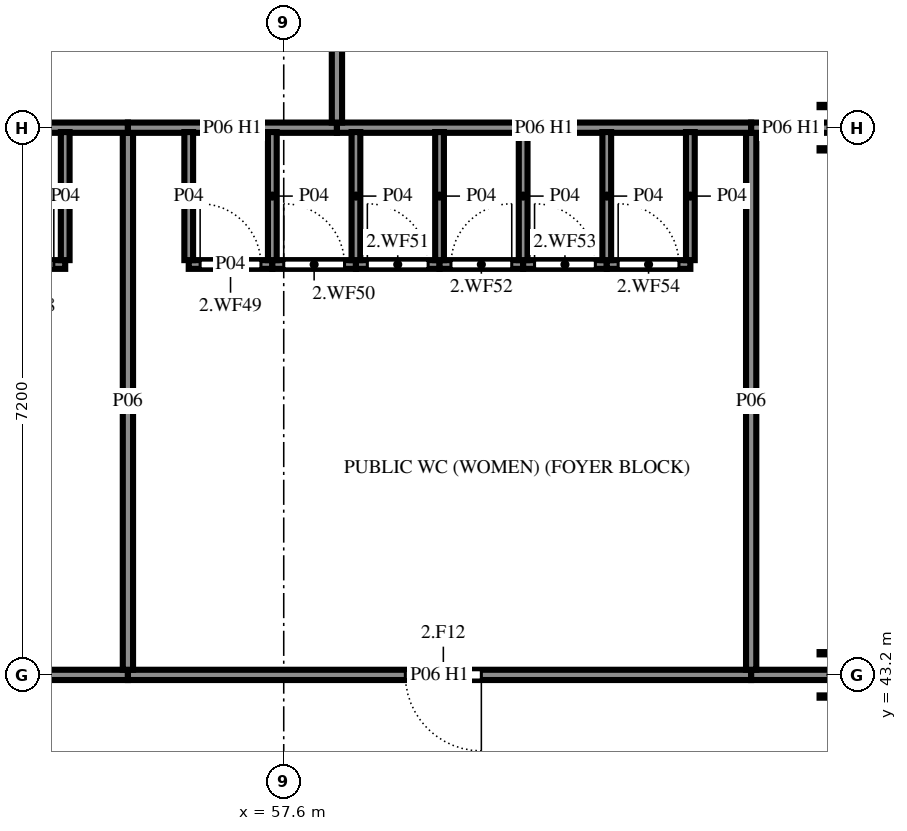
"""IFC4 building model, lengths in metres.
Left out: names, types, materials, properties, quantities, classifications, styles, units other than length and angle.
Written with IfcOpenShell. Run it as: python <this file> out.ifc"""

import sys

from ifc_helpers import new_model, si_unit, direction, frame, frame_2d, origin, origin_2d, place, context, subcontext, project, spatial, rectangle, i_section, extrude, element, fill, save


model = new_model("IFC4")
c1 = context("Model", 3, precision=1e-05, world=origin(), true_north=direction((0.0, 1.0)))
c2 = subcontext(c1, "Body", "Model", "MODEL_VIEW")
j1 = project(units=[si_unit("LENGTHUNIT", "METRE"), si_unit("PLANEANGLEUNIT", "RADIAN")], contexts=[c1])
p1 = place(None, origin())
s1 = spatial("IfcSite", under=j1, at=p1, CompositionType="ELEMENT")
p2 = place(p1, origin())
s2 = spatial("IfcBuilding", under=s1, at=p2, CompositionType="ELEMENT")
p3 = place(p2, frame((0.0, 0.0, 7.2)))
s3 = spatial("IfcBuildingStorey", under=s2, at=p3, CompositionType="ELEMENT", Elevation=7.2)
for number, where, z_axis, x_axis in (
    (1, (64.8, 43.2, 0.0), (0.0, 0.0, 1.0), (1.0, 0.0, 0.0)),
    (2, (64.8, 50.4, 0.0), (0.0, 0.0, 1.0), (1.0, 0.0, 0.0)),
):
    element("IfcColumn", number, at=place(p3, frame(where, z_axis=z_axis, x_axis=x_axis)), inside=s3, PredefinedType="COLUMN", context=c2, shape_type="SweptSolid", body=[
        extrude(i_section(OverallWidth=0.3, OverallDepth=0.6, WebThickness=0.015, FlangeThickness=0.03, FilletRadius=0.027, at=origin_2d()), origin(), (0.0, 0.0, 1.0), 3.6),
    ])
p4 = place(p3, frame((47.3, 43.2, 0.0), z_axis=(0.0, 0.0, 1.0), x_axis=(1.0, 0.0, 0.0)))
e3 = element("IfcWall", 3, at=p4, inside=s3, PredefinedType="PARTITIONING", context=c2, shape_type="SweptSolid", body=[
    extrude(rectangle(XDim=8.25, YDim=0.135, at=frame_2d((4.125, 0.0))), origin(), (0.0, 0.0, 1.0), 2.82),
])
p5 = place(p4, frame((3.65, 0.0, 0.0)))
e4 = element("IfcOpeningElement", 4, at=p5, cuts=e3, PredefinedType="OPENING", context=c2, shape_type="SweptSolid", body=[
    extrude(rectangle(XDim=1.0, YDim=2.4, at=frame_2d((0.5, 1.2))), frame((0.0, 0.077, 0.0), z_axis=(0.0, -1.0, 0.0), x_axis=(1.0, 0.0, 0.0)), (0.0, 0.0, 1.0), 0.155),
])
p6 = place(p3, frame((55.55, 43.2, 0.0), z_axis=(0.0, 0.0, 1.0), x_axis=(1.0, 0.0, 0.0)))
e5 = element("IfcWall", 5, at=p6, inside=s3, PredefinedType="PARTITIONING", context=c2, shape_type="SweptSolid", body=[
    extrude(rectangle(XDim=8.2, YDim=0.135, at=frame_2d((4.1, 0.0))), origin(), (0.0, 0.0, 1.0), 2.82),
])
p7 = place(p6, frame((3.65, 0.0, 0.0)))
e6 = element("IfcOpeningElement", 6, at=p7, cuts=e5, PredefinedType="OPENING", context=c2, shape_type="SweptSolid", body=[
    extrude(rectangle(XDim=1.0, YDim=2.4, at=frame_2d((0.5, 1.2))), frame((0.0, 0.077, 0.0), z_axis=(0.0, -1.0, 0.0), x_axis=(1.0, 0.0, 0.0)), (0.0, 0.0, 1.0), 0.155),
])
p8 = place(p3, frame((63.75, 43.2, 0.0), z_axis=(0.0, 0.0, 1.0), x_axis=(1.0, 0.0, 0.0)))
e7 = element("IfcWall", 7, at=p8, inside=s3, PredefinedType="PARTITIONING", context=c2, shape_type="SweptSolid", body=[
    extrude(rectangle(XDim=8.317, YDim=0.135, at=frame_2d((4.159, 0.0))), origin(), (0.0, 0.0, 1.0), 2.82),
])
p9 = place(p8, frame((3.65, 0.0, 0.0)))
e8 = element("IfcOpeningElement", 8, at=p9, cuts=e7, PredefinedType="OPENING", context=c2, shape_type="SweptSolid", body=[
    extrude(rectangle(XDim=1.0, YDim=2.4, at=frame_2d((0.5, 1.2))), frame((0.0, 0.077, 0.0), z_axis=(0.0, -1.0, 0.0), x_axis=(1.0, 0.0, 0.0)), (0.0, 0.0, 1.0), 0.155),
])
p10 = place(p3, frame((55.55, 50.333, 0.0), z_axis=(0.0, 0.0, 1.0), x_axis=(0.0, -1.0, 0.0)))
e9 = element("IfcWall", 9, at=p10, inside=s3, PredefinedType="PARTITIONING", context=c2, shape_type="SweptSolid", body=[
    extrude(rectangle(XDim=7.065, YDim=0.135, at=frame_2d((3.532, 0.0))), origin(), (0.0, 0.0, 1.0), 3.42),
])
p11 = place(p3, frame((48.25, 50.4, 0.0), z_axis=(0.0, 0.0, 1.0), x_axis=(1.0, 0.0, 0.0)))
e10 = element("IfcWall", 10, at=p11, inside=s3, PredefinedType="PARTITIONING", context=c2, shape_type="SweptSolid", body=[
    extrude(rectangle(XDim=7.3, YDim=0.135, at=frame_2d((3.65, 0.0))), origin(), (0.0, 0.0, 1.0), 2.82),
])
p12 = place(p3, frame((63.75, 50.333, 0.0), z_axis=(0.0, 0.0, 1.0), x_axis=(0.0, -1.0, 0.0)))
e11 = element("IfcWall", 11, at=p12, inside=s3, PredefinedType="PARTITIONING", context=c2, shape_type="SweptSolid", body=[
    extrude(rectangle(XDim=7.065, YDim=0.135, at=frame_2d((3.532, 0.0))), origin(), (0.0, 0.0, 1.0), 3.42),
])
p13 = place(p3, frame((55.55, 50.4, 0.0), z_axis=(0.0, 0.0, 1.0), x_axis=(1.0, 0.0, 0.0)))
e12 = element("IfcWall", 12, at=p13, inside=s3, PredefinedType="PARTITIONING", context=c2, shape_type="SweptSolid", body=[
    extrude(rectangle(XDim=2.75, YDim=0.135, at=frame_2d((1.375, 0.0))), origin(), (0.0, 0.0, 1.0), 2.82),
])
p14 = place(p3, frame((58.3, 50.4, 0.0), z_axis=(0.0, 0.0, 1.0), x_axis=(1.0, 0.0, 0.0)))
e13 = element("IfcWall", 13, at=p14, inside=s3, PredefinedType="PARTITIONING", context=c2, shape_type="SweptSolid", body=[
    extrude(rectangle(XDim=5.45, YDim=0.135, at=frame_2d((2.725, 0.0))), origin(), (0.0, 0.0, 1.0), 2.82),
])
p15 = place(p3, frame((63.75, 50.4, 0.0), z_axis=(0.0, 0.0, 1.0), x_axis=(1.0, 0.0, 0.0)))
e14 = element("IfcWall", 14, at=p15, inside=s3, PredefinedType="PARTITIONING", context=c2, shape_type="SweptSolid", body=[
    extrude(rectangle(XDim=1.058, YDim=0.135, at=frame_2d((0.529, 0.0))), origin(), (0.0, 0.0, 1.0), 2.82),
])
p16 = place(p3, frame((58.3, 58.133, 0.0), z_axis=(0.0, 0.0, 1.0), x_axis=(0.0, -1.0, 0.0)))
e15 = element("IfcWall", 15, at=p16, inside=s3, PredefinedType="PARTITIONING", context=c2, shape_type="SweptSolid", body=[
    extrude(rectangle(XDim=7.665, YDim=0.135, at=frame_2d((3.833, 0.0))), origin(), (0.0, 0.0, 1.0), 3.42),
])
p17 = place(p3, frame((53.625, 48.6, 0.0), z_axis=(0.0, 0.0, 1.0), x_axis=(1.0, 0.0, 0.0)))
e16 = element("IfcWall", 16, at=p17, inside=s3, PredefinedType="PARTITIONING", context=c2, shape_type="SweptSolid", body=[
    extrude(rectangle(XDim=1.1, YDim=0.115, at=frame_2d((0.55, 0.0))), origin(), (0.0, 0.0, 1.0), 3.42),
])
p18 = place(p17, frame((0.15, 0.0, 0.0)))
e17 = element("IfcOpeningElement", 17, at=p18, cuts=e16, PredefinedType="OPENING", context=c2, shape_type="SweptSolid", body=[
    extrude(rectangle(XDim=0.8, YDim=2.1, at=frame_2d((0.4, 1.05))), frame((0.0, 0.067, 0.0), z_axis=(0.0, -1.0, 0.0), x_axis=(1.0, 0.0, 0.0)), (0.0, 0.0, 1.0), 0.135),
])
p19 = place(p3, frame((54.725, 50.343, 0.0), z_axis=(0.0, 0.0, 1.0), x_axis=(0.0, -1.0, 0.0)))
e18 = element("IfcWall", 18, at=p19, inside=s3, PredefinedType="PARTITIONING", context=c2, shape_type="SweptSolid", body=[
    extrude(rectangle(XDim=1.685, YDim=0.115, at=frame_2d((0.843, 0.0))), origin(), (0.0, 0.0, 1.0), 3.42),
])
p20 = place(p3, frame((56.35, 48.6, 0.0), z_axis=(0.0, 0.0, 1.0), x_axis=(1.0, 0.0, 0.0)))
e19 = element("IfcWall", 19, at=p20, inside=s3, PredefinedType="PARTITIONING", context=c2, shape_type="SweptSolid", body=[
    extrude(rectangle(XDim=1.1, YDim=0.115, at=frame_2d((0.55, 0.0))), origin(), (0.0, 0.0, 1.0), 3.42),
])
p21 = place(p20, frame((0.15, 0.0, 0.0)))
e20 = element("IfcOpeningElement", 20, at=p21, cuts=e19, PredefinedType="OPENING", context=c2, shape_type="SweptSolid", body=[
    extrude(rectangle(XDim=0.8, YDim=2.1, at=frame_2d((0.4, 1.05))), frame((0.0, 0.067, 0.0), z_axis=(0.0, -1.0, 0.0), x_axis=(1.0, 0.0, 0.0)), (0.0, 0.0, 1.0), 0.135),
])
p22 = place(p3, frame((56.35, 50.343, 0.0), z_axis=(0.0, 0.0, 1.0), x_axis=(0.0, -1.0, 0.0)))
e21 = element("IfcWall", 21, at=p22, inside=s3, PredefinedType="PARTITIONING", context=c2, shape_type="SweptSolid", body=[
    extrude(rectangle(XDim=1.685, YDim=0.115, at=frame_2d((0.843, 0.0))), origin(), (0.0, 0.0, 1.0), 3.42),
])
p23 = place(p3, frame((57.45, 48.6, 0.0), z_axis=(0.0, 0.0, 1.0), x_axis=(1.0, 0.0, 0.0)))
e22 = element("IfcWall", 22, at=p23, inside=s3, PredefinedType="PARTITIONING", context=c2, shape_type="SweptSolid", body=[
    extrude(rectangle(XDim=1.1, YDim=0.115, at=frame_2d((0.55, 0.0))), origin(), (0.0, 0.0, 1.0), 3.42),
])
p24 = place(p23, frame((0.15, 0.0, 0.0)))
e23 = element("IfcOpeningElement", 23, at=p24, cuts=e22, PredefinedType="OPENING", context=c2, shape_type="SweptSolid", body=[
    extrude(rectangle(XDim=0.8, YDim=2.1, at=frame_2d((0.4, 1.05))), frame((0.0, 0.067, 0.0), z_axis=(0.0, -1.0, 0.0), x_axis=(1.0, 0.0, 0.0)), (0.0, 0.0, 1.0), 0.135),
])
p25 = place(p3, frame((57.45, 50.343, 0.0), z_axis=(0.0, 0.0, 1.0), x_axis=(0.0, -1.0, 0.0)))
e24 = element("IfcWall", 24, at=p25, inside=s3, PredefinedType="PARTITIONING", context=c2, shape_type="SweptSolid", body=[
    extrude(rectangle(XDim=1.685, YDim=0.115, at=frame_2d((0.843, 0.0))), origin(), (0.0, 0.0, 1.0), 3.42),
])
p26 = place(p3, frame((58.55, 48.6, 0.0), z_axis=(0.0, 0.0, 1.0), x_axis=(1.0, 0.0, 0.0)))
e25 = element("IfcWall", 25, at=p26, inside=s3, PredefinedType="PARTITIONING", context=c2, shape_type="SweptSolid", body=[
    extrude(rectangle(XDim=1.1, YDim=0.115, at=frame_2d((0.55, 0.0))), origin(), (0.0, 0.0, 1.0), 3.42),
])
p27 = place(p26, frame((0.15, 0.0, 0.0)))
e26 = element("IfcOpeningElement", 26, at=p27, cuts=e25, PredefinedType="OPENING", context=c2, shape_type="SweptSolid", body=[
    extrude(rectangle(XDim=0.8, YDim=2.1, at=frame_2d((0.4, 1.05))), frame((0.0, 0.067, 0.0), z_axis=(0.0, -1.0, 0.0), x_axis=(1.0, 0.0, 0.0)), (0.0, 0.0, 1.0), 0.135),
])
p28 = place(p3, frame((58.55, 50.343, 0.0), z_axis=(0.0, 0.0, 1.0), x_axis=(0.0, -1.0, 0.0)))
e27 = element("IfcWall", 27, at=p28, inside=s3, PredefinedType="PARTITIONING", context=c2, shape_type="SweptSolid", body=[
    extrude(rectangle(XDim=1.685, YDim=0.115, at=frame_2d((0.843, 0.0))), origin(), (0.0, 0.0, 1.0), 3.42),
])
p29 = place(p3, frame((59.65, 48.6, 0.0), z_axis=(0.0, 0.0, 1.0), x_axis=(1.0, 0.0, 0.0)))
e28 = element("IfcWall", 28, at=p29, inside=s3, PredefinedType="PARTITIONING", context=c2, shape_type="SweptSolid", body=[
    extrude(rectangle(XDim=1.1, YDim=0.115, at=frame_2d((0.55, 0.0))), origin(), (0.0, 0.0, 1.0), 3.42),
])
p30 = place(p29, frame((0.15, 0.0, 0.0)))
e29 = element("IfcOpeningElement", 29, at=p30, cuts=e28, PredefinedType="OPENING", context=c2, shape_type="SweptSolid", body=[
    extrude(rectangle(XDim=0.8, YDim=2.1, at=frame_2d((0.4, 1.05))), frame((0.0, 0.067, 0.0), z_axis=(0.0, -1.0, 0.0), x_axis=(1.0, 0.0, 0.0)), (0.0, 0.0, 1.0), 0.135),
])
p31 = place(p3, frame((59.65, 50.343, 0.0), z_axis=(0.0, 0.0, 1.0), x_axis=(0.0, -1.0, 0.0)))
e30 = element("IfcWall", 30, at=p31, inside=s3, PredefinedType="PARTITIONING", context=c2, shape_type="SweptSolid", body=[
    extrude(rectangle(XDim=1.685, YDim=0.115, at=frame_2d((0.843, 0.0))), origin(), (0.0, 0.0, 1.0), 3.42),
])
p32 = place(p3, frame((60.75, 48.6, 0.0), z_axis=(0.0, 0.0, 1.0), x_axis=(1.0, 0.0, 0.0)))
e31 = element("IfcWall", 31, at=p32, inside=s3, PredefinedType="PARTITIONING", context=c2, shape_type="SweptSolid", body=[
    extrude(rectangle(XDim=1.1, YDim=0.115, at=frame_2d((0.55, 0.0))), origin(), (0.0, 0.0, 1.0), 3.42),
])
p33 = place(p32, frame((0.15, 0.0, 0.0)))
e32 = element("IfcOpeningElement", 32, at=p33, cuts=e31, PredefinedType="OPENING", context=c2, shape_type="SweptSolid", body=[
    extrude(rectangle(XDim=0.8, YDim=2.1, at=frame_2d((0.4, 1.05))), frame((0.0, 0.067, 0.0), z_axis=(0.0, -1.0, 0.0), x_axis=(1.0, 0.0, 0.0)), (0.0, 0.0, 1.0), 0.135),
])
p34 = place(p3, frame((60.75, 50.343, 0.0), z_axis=(0.0, 0.0, 1.0), x_axis=(0.0, -1.0, 0.0)))
e33 = element("IfcWall", 33, at=p34, inside=s3, PredefinedType="PARTITIONING", context=c2, shape_type="SweptSolid", body=[
    extrude(rectangle(XDim=1.685, YDim=0.115, at=frame_2d((0.843, 0.0))), origin(), (0.0, 0.0, 1.0), 3.42),
])
p35 = place(p3, frame((61.85, 48.6, 0.0), z_axis=(0.0, 0.0, 1.0), x_axis=(1.0, 0.0, 0.0)))
e34 = element("IfcWall", 34, at=p35, inside=s3, PredefinedType="PARTITIONING", context=c2, shape_type="SweptSolid", body=[
    extrude(rectangle(XDim=1.1, YDim=0.115, at=frame_2d((0.55, 0.0))), origin(), (0.0, 0.0, 1.0), 3.42),
])
p36 = place(p35, frame((0.15, 0.0, 0.0)))
e35 = element("IfcOpeningElement", 35, at=p36, cuts=e34, PredefinedType="OPENING", context=c2, shape_type="SweptSolid", body=[
    extrude(rectangle(XDim=0.8, YDim=2.1, at=frame_2d((0.4, 1.05))), frame((0.0, 0.067, 0.0), z_axis=(0.0, -1.0, 0.0), x_axis=(1.0, 0.0, 0.0)), (0.0, 0.0, 1.0), 0.135),
])
for number, where, z_axis, x_axis in (
    (36, (61.85, 50.343, 0.0), (0.0, 0.0, 1.0), (0.0, -1.0, 0.0)),
    (37, (62.95, 50.343, 0.0), (0.0, 0.0, 1.0), (0.0, -1.0, 0.0)),
):
    element("IfcWall", number, at=place(p3, frame(where, z_axis=z_axis, x_axis=x_axis)), inside=s3, PredefinedType="PARTITIONING", context=c2, shape_type="SweptSolid", body=[
        extrude(rectangle(XDim=1.685, YDim=0.115, at=frame_2d((0.843, 0.0))), origin(), (0.0, 0.0, 1.0), 3.42),
    ])
p37 = place(p7, frame((1.0, 0.0, 0.0), z_axis=(0.0, 0.0, 1.0), x_axis=(-1.0, 0.0, 0.0)))
e38 = element("IfcDoor", 38, at=p37, inside=s3, OperationType="SINGLE_SWING_RIGHT", PredefinedType="DOOR", context=c2, shape_type="SweptSolid", body=[
    extrude(rectangle(XDim=1.0, YDim=2.4, at=frame_2d((0.5, 1.2))), frame((0.0, 0.025, 0.0), z_axis=(0.0, -1.0, 0.0), x_axis=(1.0, 0.0, 0.0)), (0.0, 0.0, 1.0), 0.05),
])
fill(e6, e38)
p38 = place(p18, origin())
e39 = element("IfcDoor", 39, at=p38, inside=s3, OperationType="SINGLE_SWING_LEFT", PredefinedType="DOOR", context=c2, shape_type="SweptSolid", body=[
    extrude(rectangle(XDim=0.8, YDim=2.1, at=frame_2d((0.4, 1.05))), frame((0.0, 0.025, 0.0), z_axis=(0.0, -1.0, 0.0), x_axis=(1.0, 0.0, 0.0)), (0.0, 0.0, 1.0), 0.05),
])
fill(e17, e39)
p39 = place(p21, origin())
e40 = element("IfcDoor", 40, at=p39, inside=s3, OperationType="SINGLE_SWING_RIGHT", PredefinedType="DOOR", context=c2, shape_type="SweptSolid", body=[
    extrude(rectangle(XDim=0.8, YDim=2.1, at=frame_2d((0.4, 1.05))), frame((0.0, 0.025, 0.0), z_axis=(0.0, -1.0, 0.0), x_axis=(1.0, 0.0, 0.0)), (0.0, 0.0, 1.0), 0.05),
])
fill(e20, e40)
p40 = place(p24, origin())
e41 = element("IfcDoor", 41, at=p40, inside=s3, OperationType="SINGLE_SWING_RIGHT", PredefinedType="DOOR", context=c2, shape_type="SweptSolid", body=[
    extrude(rectangle(XDim=0.8, YDim=2.1, at=frame_2d((0.4, 1.05))), frame((0.0, 0.025, 0.0), z_axis=(0.0, -1.0, 0.0), x_axis=(1.0, 0.0, 0.0)), (0.0, 0.0, 1.0), 0.05),
])
fill(e23, e41)
p41 = place(p27, origin())
e42 = element("IfcDoor", 42, at=p41, inside=s3, OperationType="SINGLE_SWING_RIGHT", PredefinedType="DOOR", context=c2, shape_type="SweptSolid", body=[
    extrude(rectangle(XDim=0.8, YDim=2.1, at=frame_2d((0.4, 1.05))), frame((0.0, 0.025, 0.0), z_axis=(0.0, -1.0, 0.0), x_axis=(1.0, 0.0, 0.0)), (0.0, 0.0, 1.0), 0.05),
])
fill(e26, e42)
p42 = place(p30, origin())
e43 = element("IfcDoor", 43, at=p42, inside=s3, OperationType="SINGLE_SWING_LEFT", PredefinedType="DOOR", context=c2, shape_type="SweptSolid", body=[
    extrude(rectangle(XDim=0.8, YDim=2.1, at=frame_2d((0.4, 1.05))), frame((0.0, 0.025, 0.0), z_axis=(0.0, -1.0, 0.0), x_axis=(1.0, 0.0, 0.0)), (0.0, 0.0, 1.0), 0.05),
])
fill(e29, e43)
p43 = place(p33, origin())
e44 = element("IfcDoor", 44, at=p43, inside=s3, OperationType="SINGLE_SWING_RIGHT", PredefinedType="DOOR", context=c2, shape_type="SweptSolid", body=[
    extrude(rectangle(XDim=0.8, YDim=2.1, at=frame_2d((0.4, 1.05))), frame((0.0, 0.025, 0.0), z_axis=(0.0, -1.0, 0.0), x_axis=(1.0, 0.0, 0.0)), (0.0, 0.0, 1.0), 0.05),
])
fill(e32, e44)
p44 = place(p36, origin())
e45 = element("IfcDoor", 45, at=p44, inside=s3, OperationType="SINGLE_SWING_RIGHT", PredefinedType="DOOR", context=c2, shape_type="SweptSolid", body=[
    extrude(rectangle(XDim=0.8, YDim=2.1, at=frame_2d((0.4, 1.05))), frame((0.0, 0.025, 0.0), z_axis=(0.0, -1.0, 0.0), x_axis=(1.0, 0.0, 0.0)), (0.0, 0.0, 1.0), 0.05),
])
fill(e35, e45)
save(model, sys.argv[1])
